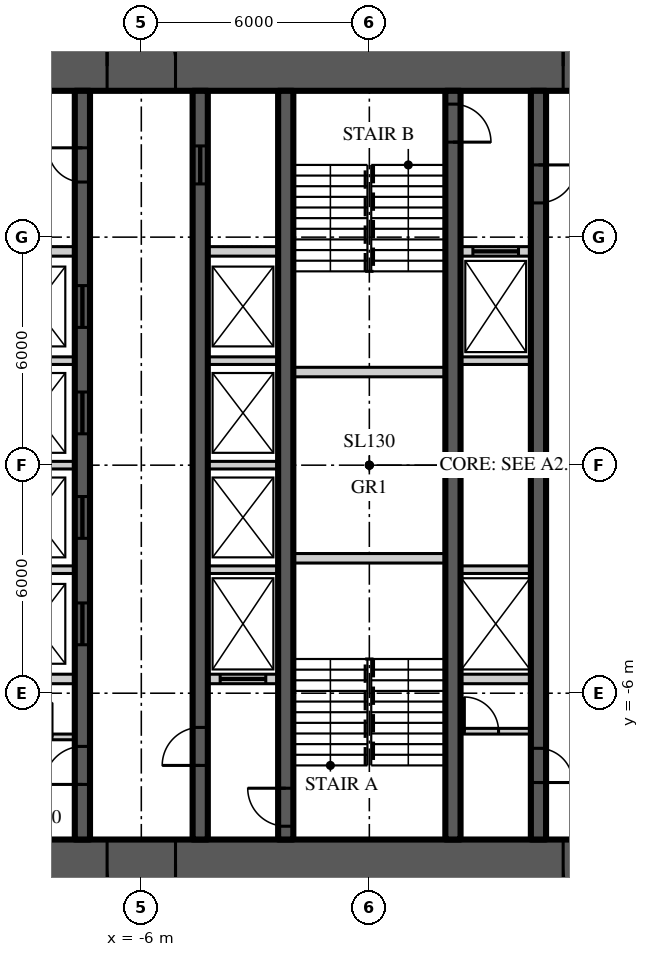
"""IFC4 building model, lengths in metres.
Left out: names, types, materials, properties, quantities, classifications, styles, units other than length and angle.
Written with IfcOpenShell. Run it as: python <this file> out.ifc"""

import sys

from ifc_helpers import new_model, si_unit, direction, frame, frame_2d, origin, place, context, subcontext, project, spatial, rectangle, extrude, element, fill, save


model = new_model("IFC4")
c1 = context("Model", 3, precision=1e-05, world=origin(), true_north=direction((0.0, 1.0)))
c2 = subcontext(c1, "Body", "Model", "MODEL_VIEW")
j1 = project(units=[si_unit("LENGTHUNIT", "METRE"), si_unit("PLANEANGLEUNIT", "RADIAN")], contexts=[c1])
p1 = place(None, origin())
s1 = spatial("IfcSite", under=j1, at=p1, CompositionType="ELEMENT")
p2 = place(p1, origin())
s2 = spatial("IfcBuilding", under=s1, at=p2, CompositionType="ELEMENT")
p3 = place(p2, frame((0.0, 0.0, 109.8)))
s3 = spatial("IfcBuildingStorey", under=s2, at=p3, CompositionType="ELEMENT", Elevation=109.8)
p4 = place(p3, frame((-11.15, 10.5, 0.0), z_axis=(0.0, 0.0, 1.0), x_axis=(1.0, 0.0, 0.0)))
e1 = element("IfcWall", 1, at=p4, inside=s3, PredefinedType="SHEAR", context=c2, shape_type="SweptSolid", body=[
    extrude(rectangle(XDim=22.3, YDim=1.3, at=frame_2d((11.15, 0.0))), origin(), (0.0, 0.0, 1.0), 3.9),
])
p5 = place(p4, frame((4.25, 0.0, 0.0)))
e2 = element("IfcOpeningElement", 2, at=p5, cuts=e1, PredefinedType="OPENING", context=c2, shape_type="SweptSolid", body=[
    extrude(rectangle(XDim=1.8, YDim=2.2, at=frame_2d((0.9, 1.1))), frame((0.0, 0.66, 0.0), z_axis=(0.0, -1.0, 0.0), x_axis=(1.0, 0.0, 0.0)), (0.0, 0.0, 1.0), 1.32),
])
p6 = place(p4, frame((16.25, 0.0, 0.0)))
e3 = element("IfcOpeningElement", 3, at=p6, cuts=e1, PredefinedType="OPENING", context=c2, shape_type="SweptSolid", body=[
    extrude(rectangle(XDim=1.8, YDim=2.2, at=frame_2d((0.9, 1.1))), frame((0.0, 0.66, 0.0), z_axis=(0.0, -1.0, 0.0), x_axis=(1.0, 0.0, 0.0)), (0.0, 0.0, 1.0), 1.32),
])
p7 = place(p3, frame((11.15, -10.5, 0.0), z_axis=(0.0, 0.0, 1.0), x_axis=(-1.0, 0.0, 0.0)))
e4 = element("IfcWall", 4, at=p7, inside=s3, PredefinedType="SHEAR", context=c2, shape_type="SweptSolid", body=[
    extrude(rectangle(XDim=22.3, YDim=1.3, at=frame_2d((11.15, 0.0))), origin(), (0.0, 0.0, 1.0), 3.9),
])
p8 = place(p7, frame((16.25, 0.0, 0.0)))
e5 = element("IfcOpeningElement", 5, at=p8, cuts=e4, PredefinedType="OPENING", context=c2, shape_type="SweptSolid", body=[
    extrude(rectangle(XDim=1.8, YDim=2.2, at=frame_2d((0.9, 1.1))), frame((0.0, 0.66, 0.0), z_axis=(0.0, -1.0, 0.0), x_axis=(1.0, 0.0, 0.0)), (0.0, 0.0, 1.0), 1.32),
])
p9 = place(p7, frame((4.25, 0.0, 0.0)))
e6 = element("IfcOpeningElement", 6, at=p9, cuts=e4, PredefinedType="OPENING", context=c2, shape_type="SweptSolid", body=[
    extrude(rectangle(XDim=1.8, YDim=2.2, at=frame_2d((0.9, 1.1))), frame((0.0, 0.66, 0.0), z_axis=(0.0, -1.0, 0.0), x_axis=(1.0, 0.0, 0.0)), (0.0, 0.0, 1.0), 1.32),
])
p10 = place(p3, frame((-7.55, -9.85, 0.0), z_axis=(0.0, 0.0, 1.0), x_axis=(0.0, 1.0, 0.0)))
e7 = element("IfcWall", 7, at=p10, inside=s3, PredefinedType="SHEAR", context=c2, shape_type="SweptSolid", body=[
    extrude(rectangle(XDim=19.7, YDim=0.4, at=frame_2d((9.85, 0.0))), origin(), (0.0, 0.0, 1.0), 3.9),
])
p11 = place(p10, frame((1.45, 0.0, 0.0)))
e8 = element("IfcOpeningElement", 8, at=p11, cuts=e7, PredefinedType="OPENING", context=c2, shape_type="SweptSolid", body=[
    extrude(rectangle(XDim=1.0, YDim=2.2, at=frame_2d((0.5, 1.1))), frame((0.0, 0.21, 0.0), z_axis=(0.0, -1.0, 0.0), x_axis=(1.0, 0.0, 0.0)), (0.0, 0.0, 1.0), 0.42),
])
p12 = place(p10, frame((17.3, 0.0, 0.0)))
e9 = element("IfcOpeningElement", 9, at=p12, cuts=e7, PredefinedType="OPENING", context=c2, shape_type="SweptSolid", body=[
    extrude(rectangle(XDim=0.9, YDim=2.1, at=frame_2d((0.45, 1.05))), frame((0.0, 0.21, 0.0), z_axis=(0.0, -1.0, 0.0), x_axis=(1.0, 0.0, 0.0)), (0.0, 0.0, 1.0), 0.42),
])
p13 = place(p10, frame((5.125, 0.0, 0.0)))
e10 = element("IfcOpeningElement", 10, at=p13, cuts=e7, PredefinedType="OPENING", context=c2, shape_type="SweptSolid", body=[
    extrude(rectangle(XDim=1.1, YDim=2.2, at=frame_2d((0.55, 1.1))), frame((0.0, 0.21, 0.0), z_axis=(0.0, -1.0, 0.0), x_axis=(1.0, 0.0, 0.0)), (0.0, 0.0, 1.0), 0.42),
])
p14 = place(p10, frame((7.925, 0.0, 0.0)))
e11 = element("IfcOpeningElement", 11, at=p14, cuts=e7, PredefinedType="OPENING", context=c2, shape_type="SweptSolid", body=[
    extrude(rectangle(XDim=1.1, YDim=2.2, at=frame_2d((0.55, 1.1))), frame((0.0, 0.21, 0.0), z_axis=(0.0, -1.0, 0.0), x_axis=(1.0, 0.0, 0.0)), (0.0, 0.0, 1.0), 0.42),
])
p15 = place(p10, frame((10.675, 0.0, 0.0)))
e12 = element("IfcOpeningElement", 12, at=p15, cuts=e7, PredefinedType="OPENING", context=c2, shape_type="SweptSolid", body=[
    extrude(rectangle(XDim=1.1, YDim=2.2, at=frame_2d((0.55, 1.1))), frame((0.0, 0.21, 0.0), z_axis=(0.0, -1.0, 0.0), x_axis=(1.0, 0.0, 0.0)), (0.0, 0.0, 1.0), 0.42),
])
p16 = place(p10, frame((13.475, 0.0, 0.0)))
e13 = element("IfcOpeningElement", 13, at=p16, cuts=e7, PredefinedType="OPENING", context=c2, shape_type="SweptSolid", body=[
    extrude(rectangle(XDim=1.1, YDim=2.2, at=frame_2d((0.55, 1.1))), frame((0.0, 0.21, 0.0), z_axis=(0.0, -1.0, 0.0), x_axis=(1.0, 0.0, 0.0)), (0.0, 0.0, 1.0), 0.42),
])
p17 = place(p3, frame((-4.45, -9.85, 0.0), z_axis=(0.0, 0.0, 1.0), x_axis=(0.0, 1.0, 0.0)))
e14 = element("IfcWall", 14, at=p17, inside=s3, PredefinedType="SHEAR", context=c2, shape_type="SweptSolid", body=[
    extrude(rectangle(XDim=19.7, YDim=0.4, at=frame_2d((9.85, 0.0))), origin(), (0.0, 0.0, 1.0), 3.9),
])
p18 = place(p17, frame((1.95, 0.0, 0.0)))
e15 = element("IfcOpeningElement", 15, at=p18, cuts=e14, PredefinedType="OPENING", context=c2, shape_type="SweptSolid", body=[
    extrude(rectangle(XDim=1.0, YDim=2.2, at=frame_2d((0.5, 1.1))), frame((0.0, 0.21, 0.0), z_axis=(0.0, -1.0, 0.0), x_axis=(1.0, 0.0, 0.0)), (0.0, 0.0, 1.0), 0.42),
])
p19 = place(p17, frame((17.25, 0.0, 0.0)))
e16 = element("IfcOpeningElement", 16, at=p19, cuts=e14, PredefinedType="OPENING", context=c2, shape_type="SweptSolid", body=[
    extrude(rectangle(XDim=1.0, YDim=2.1, at=frame_2d((0.5, 1.05))), frame((0.0, 0.21, 0.0), z_axis=(0.0, -1.0, 0.0), x_axis=(1.0, 0.0, 0.0)), (0.0, 0.0, 1.0), 0.42),
])
p20 = place(p3, frame((4.45, 9.85, 0.0), z_axis=(0.0, 0.0, 1.0), x_axis=(0.0, -1.0, 0.0)))
e17 = element("IfcWall", 17, at=p20, inside=s3, PredefinedType="SHEAR", context=c2, shape_type="SweptSolid", body=[
    extrude(rectangle(XDim=19.7, YDim=0.4, at=frame_2d((9.85, 0.0))), origin(), (0.0, 0.0, 1.0), 3.9),
])
p21 = place(p20, frame((1.95, 0.0, 0.0)))
e18 = element("IfcOpeningElement", 18, at=p21, cuts=e17, PredefinedType="OPENING", context=c2, shape_type="SweptSolid", body=[
    extrude(rectangle(XDim=1.0, YDim=2.2, at=frame_2d((0.5, 1.1))), frame((0.0, 0.21, 0.0), z_axis=(0.0, -1.0, 0.0), x_axis=(1.0, 0.0, 0.0)), (0.0, 0.0, 1.0), 0.42),
])
p22 = place(p20, frame((17.3, 0.0, 0.0)))
e19 = element("IfcOpeningElement", 19, at=p22, cuts=e17, PredefinedType="OPENING", context=c2, shape_type="SweptSolid", body=[
    extrude(rectangle(XDim=0.9, YDim=2.1, at=frame_2d((0.45, 1.05))), frame((0.0, 0.21, 0.0), z_axis=(0.0, -1.0, 0.0), x_axis=(1.0, 0.0, 0.0)), (0.0, 0.0, 1.0), 0.42),
])
p23 = place(p3, frame((-2.2, -9.85, 0.0), z_axis=(0.0, 0.0, 1.0), x_axis=(0.0, 1.0, 0.0)))
e20 = element("IfcWall", 20, at=p23, inside=s3, PredefinedType="SHEAR", context=c2, shape_type="SweptSolid", body=[
    extrude(rectangle(XDim=19.7, YDim=0.4, at=frame_2d((9.85, 0.0))), origin(), (0.0, 0.0, 1.0), 3.9),
])
p24 = place(p23, frame((0.35, 0.0, 0.0)))
e21 = element("IfcOpeningElement", 21, at=p24, cuts=e20, PredefinedType="OPENING", context=c2, shape_type="SweptSolid", body=[
    extrude(rectangle(XDim=1.0, YDim=2.2, at=frame_2d((0.5, 1.1))), frame((0.0, 0.21, 0.0), z_axis=(0.0, -1.0, 0.0), x_axis=(1.0, 0.0, 0.0)), (0.0, 0.0, 1.0), 0.42),
])
p25 = place(p3, frame((2.2, 9.85, 0.0), z_axis=(0.0, 0.0, 1.0), x_axis=(0.0, -1.0, 0.0)))
e22 = element("IfcWall", 22, at=p25, inside=s3, PredefinedType="SHEAR", context=c2, shape_type="SweptSolid", body=[
    extrude(rectangle(XDim=19.7, YDim=0.4, at=frame_2d((9.85, 0.0))), origin(), (0.0, 0.0, 1.0), 3.9),
])
p26 = place(p25, frame((0.35, 0.0, 0.0)))
e23 = element("IfcOpeningElement", 23, at=p26, cuts=e22, PredefinedType="OPENING", context=c2, shape_type="SweptSolid", body=[
    extrude(rectangle(XDim=1.0, YDim=2.2, at=frame_2d((0.5, 1.1))), frame((0.0, 0.21, 0.0), z_axis=(0.0, -1.0, 0.0), x_axis=(1.0, 0.0, 0.0)), (0.0, 0.0, 1.0), 0.42),
])
p27 = place(p3, frame((-9.85, 5.625, 0.0), z_axis=(0.0, 0.0, 1.0), x_axis=(1.0, 0.0, 0.0)))
e24 = element("IfcWall", 24, at=p27, inside=s3, PredefinedType="SOLIDWALL", context=c2, shape_type="SweptSolid", body=[
    extrude(rectangle(XDim=2.1, YDim=0.25, at=frame_2d((1.05, 0.0))), origin(), (0.0, 0.0, 1.0), 3.7),
])
p28 = place(p3, frame((-4.25, 5.625, 0.0), z_axis=(0.0, 0.0, 1.0), x_axis=(1.0, 0.0, 0.0)))
e25 = element("IfcWall", 25, at=p28, inside=s3, PredefinedType="SOLIDWALL", context=c2, shape_type="SweptSolid", body=[
    extrude(rectangle(XDim=1.85, YDim=0.25, at=frame_2d((0.925, 0.0))), origin(), (0.0, 0.0, 1.0), 3.7),
])
p29 = place(p3, frame((2.4, 5.625, 0.0), z_axis=(0.0, 0.0, 1.0), x_axis=(1.0, 0.0, 0.0)))
e26 = element("IfcWall", 26, at=p29, inside=s3, PredefinedType="SOLIDWALL", context=c2, shape_type="SweptSolid", body=[
    extrude(rectangle(XDim=1.85, YDim=0.25, at=frame_2d((0.925, 0.0))), origin(), (0.0, 0.0, 1.0), 3.7),
])
p30 = place(p29, frame((0.325, 0.0, 0.0)))
e27 = element("IfcOpeningElement", 27, at=p30, cuts=e26, PredefinedType="OPENING", context=c2, shape_type="SweptSolid", body=[
    extrude(rectangle(XDim=1.2, YDim=2.2, at=frame_2d((0.6, 1.1))), frame((0.0, 0.135, 0.0), z_axis=(0.0, -1.0, 0.0), x_axis=(1.0, 0.0, 0.0)), (0.0, 0.0, 1.0), 0.27),
])
p31 = place(p3, frame((-9.85, -5.625, 0.0), z_axis=(0.0, 0.0, 1.0), x_axis=(1.0, 0.0, 0.0)))
e28 = element("IfcWall", 28, at=p31, inside=s3, PredefinedType="SOLIDWALL", context=c2, shape_type="SweptSolid", body=[
    extrude(rectangle(XDim=2.1, YDim=0.25, at=frame_2d((1.05, 0.0))), origin(), (0.0, 0.0, 1.0), 3.7),
])
p32 = place(p3, frame((-4.25, -5.625, 0.0), z_axis=(0.0, 0.0, 1.0), x_axis=(1.0, 0.0, 0.0)))
e29 = element("IfcWall", 29, at=p32, inside=s3, PredefinedType="SOLIDWALL", context=c2, shape_type="SweptSolid", body=[
    extrude(rectangle(XDim=1.85, YDim=0.25, at=frame_2d((0.925, 0.0))), origin(), (0.0, 0.0, 1.0), 3.7),
])
p33 = place(p32, frame((0.325, 0.0, 0.0)))
e30 = element("IfcOpeningElement", 30, at=p33, cuts=e29, PredefinedType="OPENING", context=c2, shape_type="SweptSolid", body=[
    extrude(rectangle(XDim=1.2, YDim=2.2, at=frame_2d((0.6, 1.1))), frame((0.0, 0.135, 0.0), z_axis=(0.0, -1.0, 0.0), x_axis=(1.0, 0.0, 0.0)), (0.0, 0.0, 1.0), 0.27),
])
p34 = place(p3, frame((2.4, -5.625, 0.0), z_axis=(0.0, 0.0, 1.0), x_axis=(1.0, 0.0, 0.0)))
e31 = element("IfcWall", 31, at=p34, inside=s3, PredefinedType="SOLIDWALL", context=c2, shape_type="SweptSolid", body=[
    extrude(rectangle(XDim=1.85, YDim=0.25, at=frame_2d((0.925, 0.0))), origin(), (0.0, 0.0, 1.0), 3.7),
])
for number, where, z_axis, x_axis in (
    (32, (-2.0, -2.45, 0.0), (0.0, 0.0, 1.0), (1.0, 0.0, 0.0)),
    (33, (-2.0, 2.45, 0.0), (0.0, 0.0, 1.0), (1.0, 0.0, 0.0)),
):
    element("IfcWall", number, at=place(p3, frame(where, z_axis=z_axis, x_axis=x_axis)), inside=s3, PredefinedType="SOLIDWALL", context=c2, shape_type="SweptSolid", body=[
        extrude(rectangle(XDim=4.0, YDim=0.25, at=frame_2d((2.0, 0.0))), origin(), (0.0, 0.0, 1.0), 3.7),
    ])
p35 = place(p3, frame((-9.85, -2.75, 0.0), z_axis=(0.0, 0.0, 1.0), x_axis=(1.0, 0.0, 0.0)))
e34 = element("IfcWall", 34, at=p35, inside=s3, PredefinedType="SOLIDWALL", context=c2, shape_type="SweptSolid", body=[
    extrude(rectangle(XDim=2.1, YDim=0.2, at=frame_2d((1.05, 0.0))), origin(), (0.0, 0.0, 1.0), 3.7),
])
for number, where, z_axis, x_axis in (
    (35, (-4.25, -2.75, 0.0), (0.0, 0.0, 1.0), (1.0, 0.0, 0.0)),
    (36, (2.4, -2.75, 0.0), (0.0, 0.0, 1.0), (1.0, 0.0, 0.0)),
):
    element("IfcWall", number, at=place(p3, frame(where, z_axis=z_axis, x_axis=x_axis)), inside=s3, PredefinedType="SOLIDWALL", context=c2, shape_type="SweptSolid", body=[
        extrude(rectangle(XDim=1.85, YDim=0.2, at=frame_2d((0.925, 0.0))), origin(), (0.0, 0.0, 1.0), 3.7),
    ])
p36 = place(p3, frame((-9.85, 0.0, 0.0), z_axis=(0.0, 0.0, 1.0), x_axis=(1.0, 0.0, 0.0)))
e37 = element("IfcWall", 37, at=p36, inside=s3, PredefinedType="SOLIDWALL", context=c2, shape_type="SweptSolid", body=[
    extrude(rectangle(XDim=2.1, YDim=0.2, at=frame_2d((1.05, 0.0))), origin(), (0.0, 0.0, 1.0), 3.7),
])
p37 = place(p3, frame((-4.25, 0.0, 0.0), z_axis=(0.0, 0.0, 1.0), x_axis=(1.0, 0.0, 0.0)))
e38 = element("IfcWall", 38, at=p37, inside=s3, PredefinedType="SOLIDWALL", context=c2, shape_type="SweptSolid", body=[
    extrude(rectangle(XDim=1.85, YDim=0.2, at=frame_2d((0.925, 0.0))), origin(), (0.0, 0.0, 1.0), 3.7),
])
p38 = place(p3, frame((-9.85, 2.75, 0.0), z_axis=(0.0, 0.0, 1.0), x_axis=(1.0, 0.0, 0.0)))
e39 = element("IfcWall", 39, at=p38, inside=s3, PredefinedType="SOLIDWALL", context=c2, shape_type="SweptSolid", body=[
    extrude(rectangle(XDim=2.1, YDim=0.2, at=frame_2d((1.05, 0.0))), origin(), (0.0, 0.0, 1.0), 3.7),
])
for number, where, z_axis, x_axis in (
    (40, (-4.25, 2.75, 0.0), (0.0, 0.0, 1.0), (1.0, 0.0, 0.0)),
    (41, (2.4, 2.75, 0.0), (0.0, 0.0, 1.0), (1.0, 0.0, 0.0)),
):
    element("IfcWall", number, at=place(p3, frame(where, z_axis=z_axis, x_axis=x_axis)), inside=s3, PredefinedType="SOLIDWALL", context=c2, shape_type="SweptSolid", body=[
        extrude(rectangle(XDim=1.85, YDim=0.2, at=frame_2d((0.925, 0.0))), origin(), (0.0, 0.0, 1.0), 3.7),
    ])
p39 = place(p3, frame((2.4, -7.0, 0.0), z_axis=(0.0, 0.0, 1.0), x_axis=(1.0, 0.0, 0.0)))
e42 = element("IfcWall", 42, at=p39, inside=s3, PredefinedType="SOLIDWALL", context=c2, shape_type="SweptSolid", body=[
    extrude(rectangle(XDim=1.85, YDim=0.15, at=frame_2d((0.925, 0.0))), origin(), (0.0, 0.0, 1.0), 3.77),
])
p40 = place(p39, frame((0.1, 0.0, 0.0)))
e43 = element("IfcOpeningElement", 43, at=p40, cuts=e42, PredefinedType="OPENING", context=c2, shape_type="SweptSolid", body=[
    extrude(rectangle(XDim=0.9, YDim=2.1, at=frame_2d((0.45, 1.05))), frame((0.0, 0.085, 0.0), z_axis=(0.0, -1.0, 0.0), x_axis=(1.0, 0.0, 0.0)), (0.0, 0.0, 1.0), 0.17),
])
p41 = place(p3, frame((-9.85, -7.15, 0.0), z_axis=(0.0, 0.0, 1.0), x_axis=(1.0, 0.0, 0.0)))
e44 = element("IfcWall", 44, at=p41, inside=s3, PredefinedType="SOLIDWALL", context=c2, shape_type="SweptSolid", body=[
    extrude(rectangle(XDim=2.1, YDim=0.15, at=frame_2d((1.05, 0.0))), origin(), (0.0, 0.0, 1.0), 3.77),
])
p42 = place(p41, frame((0.6, 0.0, 0.0)))
e45 = element("IfcOpeningElement", 45, at=p42, cuts=e44, PredefinedType="OPENING", context=c2, shape_type="SweptSolid", body=[
    extrude(rectangle(XDim=0.9, YDim=2.1, at=frame_2d((0.45, 1.05))), frame((0.0, 0.085, 0.0), z_axis=(0.0, -1.0, 0.0), x_axis=(1.0, 0.0, 0.0)), (0.0, 0.0, 1.0), 0.17),
])
p43 = place(p5, origin())
e46 = element("IfcDoor", 46, at=p43, inside=s3, OperationType="DOUBLE_DOOR_DOUBLE_SWING", PredefinedType="DOOR", context=c2, shape_type="SweptSolid", body=[
    extrude(rectangle(XDim=1.8, YDim=2.2, at=frame_2d((0.9, 1.1))), frame((0.0, 0.025, 0.0), z_axis=(0.0, -1.0, 0.0), x_axis=(1.0, 0.0, 0.0)), (0.0, 0.0, 1.0), 0.05),
])
fill(e2, e46)
p44 = place(p8, origin())
e47 = element("IfcDoor", 47, at=p44, inside=s3, OperationType="DOUBLE_DOOR_DOUBLE_SWING", PredefinedType="DOOR", context=c2, shape_type="SweptSolid", body=[
    extrude(rectangle(XDim=1.8, YDim=2.2, at=frame_2d((0.9, 1.1))), frame((0.0, 0.025, 0.0), z_axis=(0.0, -1.0, 0.0), x_axis=(1.0, 0.0, 0.0)), (0.0, 0.0, 1.0), 0.05),
])
fill(e5, e47)
p45 = place(p6, origin())
e48 = element("IfcDoor", 48, at=p45, inside=s3, OperationType="DOUBLE_DOOR_DOUBLE_SWING", PredefinedType="DOOR", context=c2, shape_type="SweptSolid", body=[
    extrude(rectangle(XDim=1.8, YDim=2.2, at=frame_2d((0.9, 1.1))), frame((0.0, 0.025, 0.0), z_axis=(0.0, -1.0, 0.0), x_axis=(1.0, 0.0, 0.0)), (0.0, 0.0, 1.0), 0.05),
])
fill(e3, e48)
p46 = place(p9, origin())
e49 = element("IfcDoor", 49, at=p46, inside=s3, OperationType="DOUBLE_DOOR_DOUBLE_SWING", PredefinedType="DOOR", context=c2, shape_type="SweptSolid", body=[
    extrude(rectangle(XDim=1.8, YDim=2.2, at=frame_2d((0.9, 1.1))), frame((0.0, 0.025, 0.0), z_axis=(0.0, -1.0, 0.0), x_axis=(1.0, 0.0, 0.0)), (0.0, 0.0, 1.0), 0.05),
])
fill(e6, e49)
p47 = place(p11, origin())
e50 = element("IfcDoor", 50, at=p47, inside=s3, OperationType="SINGLE_SWING_LEFT", PredefinedType="DOOR", context=c2, shape_type="SweptSolid", body=[
    extrude(rectangle(XDim=1.0, YDim=2.2, at=frame_2d((0.5, 1.1))), frame((0.0, 0.025, 0.0), z_axis=(0.0, -1.0, 0.0), x_axis=(1.0, 0.0, 0.0)), (0.0, 0.0, 1.0), 0.05),
])
fill(e8, e50)
p48 = place(p18, origin())
e51 = element("IfcDoor", 51, at=p48, inside=s3, OperationType="SINGLE_SWING_LEFT", PredefinedType="DOOR", context=c2, shape_type="SweptSolid", body=[
    extrude(rectangle(XDim=1.0, YDim=2.2, at=frame_2d((0.5, 1.1))), frame((0.0, 0.025, 0.0), z_axis=(0.0, -1.0, 0.0), x_axis=(1.0, 0.0, 0.0)), (0.0, 0.0, 1.0), 0.05),
])
fill(e15, e51)
p49 = place(p24, origin())
e52 = element("IfcDoor", 52, at=p49, inside=s3, OperationType="SINGLE_SWING_RIGHT", PredefinedType="DOOR", context=c2, shape_type="SweptSolid", body=[
    extrude(rectangle(XDim=1.0, YDim=2.2, at=frame_2d((0.5, 1.1))), frame((0.0, 0.025, 0.0), z_axis=(0.0, -1.0, 0.0), x_axis=(1.0, 0.0, 0.0)), (0.0, 0.0, 1.0), 0.05),
])
fill(e21, e52)
p50 = place(p21, origin())
e53 = element("IfcDoor", 53, at=p50, inside=s3, OperationType="SINGLE_SWING_LEFT", PredefinedType="DOOR", context=c2, shape_type="SweptSolid", body=[
    extrude(rectangle(XDim=1.0, YDim=2.2, at=frame_2d((0.5, 1.1))), frame((0.0, 0.025, 0.0), z_axis=(0.0, -1.0, 0.0), x_axis=(1.0, 0.0, 0.0)), (0.0, 0.0, 1.0), 0.05),
])
fill(e18, e53)
p51 = place(p26, origin())
e54 = element("IfcDoor", 54, at=p51, inside=s3, OperationType="SINGLE_SWING_RIGHT", PredefinedType="DOOR", context=c2, shape_type="SweptSolid", body=[
    extrude(rectangle(XDim=1.0, YDim=2.2, at=frame_2d((0.5, 1.1))), frame((0.0, 0.025, 0.0), z_axis=(0.0, -1.0, 0.0), x_axis=(1.0, 0.0, 0.0)), (0.0, 0.0, 1.0), 0.05),
])
fill(e23, e54)
p52 = place(p12, origin())
e55 = element("IfcDoor", 55, at=p52, inside=s3, OperationType="SINGLE_SWING_RIGHT", PredefinedType="DOOR", context=c2, shape_type="SweptSolid", body=[
    extrude(rectangle(XDim=0.9, YDim=2.1, at=frame_2d((0.45, 1.05))), frame((0.0, 0.025, 0.0), z_axis=(0.0, -1.0, 0.0), x_axis=(1.0, 0.0, 0.0)), (0.0, 0.0, 1.0), 0.05),
])
fill(e9, e55)
p53 = place(p19, origin())
e56 = element("IfcDoor", 56, at=p53, inside=s3, OperationType="SLIDING_TO_LEFT", PredefinedType="DOOR", context=c2, shape_type="SweptSolid", body=[
    extrude(rectangle(XDim=1.0, YDim=2.1, at=frame_2d((0.5, 1.05))), frame((0.0, 0.025, 0.0), z_axis=(0.0, -1.0, 0.0), x_axis=(1.0, 0.0, 0.0)), (0.0, 0.0, 1.0), 0.05),
])
fill(e16, e56)
p54 = place(p22, origin())
e57 = element("IfcDoor", 57, at=p54, inside=s3, OperationType="SINGLE_SWING_RIGHT", PredefinedType="DOOR", context=c2, shape_type="SweptSolid", body=[
    extrude(rectangle(XDim=0.9, YDim=2.1, at=frame_2d((0.45, 1.05))), frame((0.0, 0.025, 0.0), z_axis=(0.0, -1.0, 0.0), x_axis=(1.0, 0.0, 0.0)), (0.0, 0.0, 1.0), 0.05),
])
fill(e19, e57)
p55 = place(p13, origin())
e58 = element("IfcDoor", 58, at=p55, inside=s3, OperationType="SLIDING_TO_LEFT", PredefinedType="DOOR", context=c2, shape_type="SweptSolid", body=[
    extrude(rectangle(XDim=1.1, YDim=2.2, at=frame_2d((0.55, 1.1))), frame((0.0, 0.025, 0.0), z_axis=(0.0, -1.0, 0.0), x_axis=(1.0, 0.0, 0.0)), (0.0, 0.0, 1.0), 0.05),
])
fill(e10, e58)
p56 = place(p14, origin())
e59 = element("IfcDoor", 59, at=p56, inside=s3, OperationType="SLIDING_TO_LEFT", PredefinedType="DOOR", context=c2, shape_type="SweptSolid", body=[
    extrude(rectangle(XDim=1.1, YDim=2.2, at=frame_2d((0.55, 1.1))), frame((0.0, 0.025, 0.0), z_axis=(0.0, -1.0, 0.0), x_axis=(1.0, 0.0, 0.0)), (0.0, 0.0, 1.0), 0.05),
])
fill(e11, e59)
p57 = place(p15, origin())
e60 = element("IfcDoor", 60, at=p57, inside=s3, OperationType="SLIDING_TO_LEFT", PredefinedType="DOOR", context=c2, shape_type="SweptSolid", body=[
    extrude(rectangle(XDim=1.1, YDim=2.2, at=frame_2d((0.55, 1.1))), frame((0.0, 0.025, 0.0), z_axis=(0.0, -1.0, 0.0), x_axis=(1.0, 0.0, 0.0)), (0.0, 0.0, 1.0), 0.05),
])
fill(e12, e60)
p58 = place(p16, origin())
e61 = element("IfcDoor", 61, at=p58, inside=s3, OperationType="SLIDING_TO_LEFT", PredefinedType="DOOR", context=c2, shape_type="SweptSolid", body=[
    extrude(rectangle(XDim=1.1, YDim=2.2, at=frame_2d((0.55, 1.1))), frame((0.0, 0.025, 0.0), z_axis=(0.0, -1.0, 0.0), x_axis=(1.0, 0.0, 0.0)), (0.0, 0.0, 1.0), 0.05),
])
fill(e13, e61)
p59 = place(p33, origin())
e62 = element("IfcDoor", 62, at=p59, inside=s3, OperationType="SLIDING_TO_LEFT", PredefinedType="DOOR", context=c2, shape_type="SweptSolid", body=[
    extrude(rectangle(XDim=1.2, YDim=2.2, at=frame_2d((0.6, 1.1))), frame((0.0, 0.025, 0.0), z_axis=(0.0, -1.0, 0.0), x_axis=(1.0, 0.0, 0.0)), (0.0, 0.0, 1.0), 0.05),
])
fill(e30, e62)
p60 = place(p30, origin())
e63 = element("IfcDoor", 63, at=p60, inside=s3, OperationType="SLIDING_TO_LEFT", PredefinedType="DOOR", context=c2, shape_type="SweptSolid", body=[
    extrude(rectangle(XDim=1.2, YDim=2.2, at=frame_2d((0.6, 1.1))), frame((0.0, 0.025, 0.0), z_axis=(0.0, -1.0, 0.0), x_axis=(1.0, 0.0, 0.0)), (0.0, 0.0, 1.0), 0.05),
])
fill(e27, e63)
p61 = place(p40, origin())
e64 = element("IfcDoor", 64, at=p61, inside=s3, OperationType="SINGLE_SWING_LEFT", PredefinedType="DOOR", context=c2, shape_type="SweptSolid", body=[
    extrude(rectangle(XDim=0.9, YDim=2.1, at=frame_2d((0.45, 1.05))), frame((0.0, 0.025, 0.0), z_axis=(0.0, -1.0, 0.0), x_axis=(1.0, 0.0, 0.0)), (0.0, 0.0, 1.0), 0.05),
])
fill(e43, e64)
save(model, sys.argv[1])
